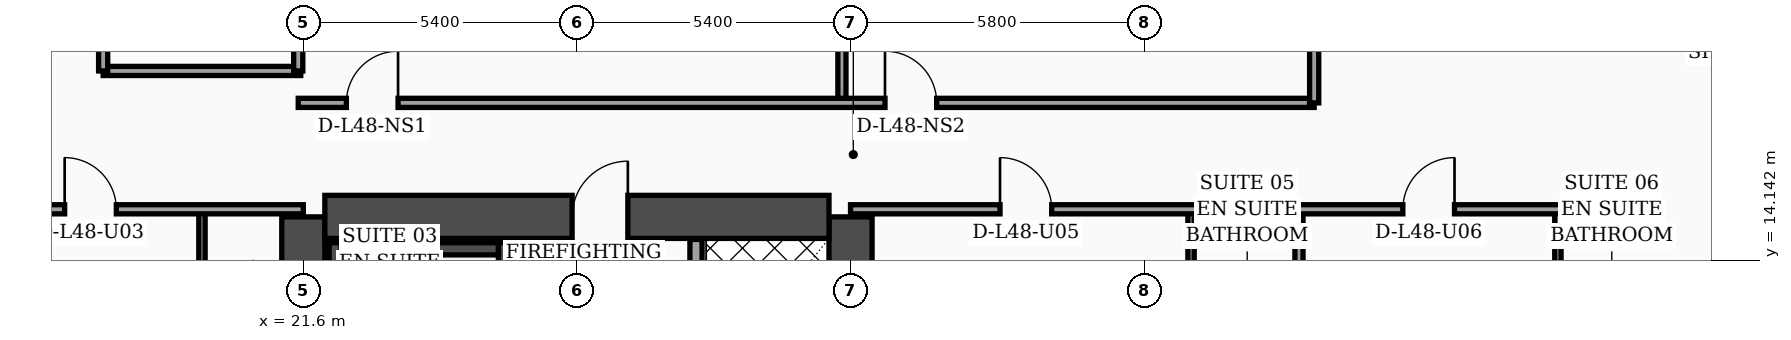
"""IFC4 building model, lengths in metres.
Left out: names, types, materials, properties, quantities, classifications, styles, units other than length and angle.
Written with IfcOpenShell. Run it as: python <this file> out.ifc"""

import sys

from ifc_helpers import new_model, si_unit, direction, frame, frame_2d, origin, place, context, subcontext, project, spatial, rectangle, extrude, element, fill, save


model = new_model("IFC4")
c1 = context("Model", 3, precision=1e-05, world=origin(), true_north=direction((0.0, 1.0)))
c2 = subcontext(c1, "Body", "Model", "MODEL_VIEW")
j1 = project(units=[si_unit("LENGTHUNIT", "METRE"), si_unit("PLANEANGLEUNIT", "RADIAN")], contexts=[c1])
p1 = place(None, origin())
s1 = spatial("IfcSite", under=j1, at=p1, CompositionType="ELEMENT")
p2 = place(p1, origin())
s2 = spatial("IfcBuilding", under=s1, at=p2, CompositionType="ELEMENT")
p3 = place(p2, frame((0.0, 0.0, 195.1)))
s3 = spatial("IfcBuildingStorey", under=s2, at=p3, CompositionType="ELEMENT", Elevation=195.1)
for number, where, z_axis, x_axis in (
    (1, (21.6, 4.6, 0.0), (0.0, 0.0, 1.0), (0.0, 1.0, 0.0)),
    (2, (32.4, 4.6, 0.0), (0.0, 0.0, 1.0), (0.0, 1.0, 0.0)),
):
    element("IfcWall", number, at=place(p3, frame(where, z_axis=z_axis, x_axis=x_axis)), inside=s3, PredefinedType="SHEAR", context=c2, shape_type="SweptSolid", body=[
        extrude(rectangle(XDim=10.4, YDim=0.85, at=frame_2d((5.2, 0.0))), origin(), (0.0, 0.0, 1.0), 4.05),
    ])
p4 = place(p3, frame((22.025, 15.0, 0.0), z_axis=(0.0, 0.0, 1.0), x_axis=(1.0, 0.0, 0.0)))
e3 = element("IfcWall", 3, at=p4, inside=s3, PredefinedType="SHEAR", context=c2, shape_type="SweptSolid", body=[
    extrude(rectangle(XDim=9.95, YDim=0.85, at=frame_2d((4.975, 0.0))), origin(), (0.0, 0.0, 1.0), 4.05),
])
p5 = place(p4, frame((4.88, 0.0, 0.0)))
e4 = element("IfcOpeningElement", 4, at=p5, cuts=e3, PredefinedType="OPENING", context=c2, shape_type="SweptSolid", body=[
    extrude(rectangle(XDim=1.1, YDim=2.2, at=frame_2d((0.55, 1.1))), frame((0.0, 0.435, 0.0), z_axis=(0.0, -1.0, 0.0), x_axis=(1.0, 0.0, 0.0)), (0.0, 0.0, 1.0), 0.87),
])
p6 = place(p3, frame((22.23, 5.025, 0.0), z_axis=(0.0, 0.0, 1.0), x_axis=(0.0, 1.0, 0.0)))
e5 = element("IfcWall", 5, at=p6, inside=s3, PredefinedType="SOLIDWALL", context=c2, shape_type="SweptSolid", body=[
    extrude(rectangle(XDim=9.465, YDim=0.24, at=frame_2d((4.732, 0.0))), origin(), (0.0, 0.0, 1.0), 4.05),
])
p7 = place(p3, frame((25.57, 5.025, 0.0), z_axis=(0.0, 0.0, 1.0), x_axis=(0.0, 1.0, 0.0)))
e6 = element("IfcWall", 6, at=p7, inside=s3, PredefinedType="SOLIDWALL", context=c2, shape_type="SweptSolid", body=[
    extrude(rectangle(XDim=9.465, YDim=0.24, at=frame_2d((4.732, 0.0))), origin(), (0.0, 0.0, 1.0), 4.05),
])
p8 = place(p7, frame((0.35, 0.0, 0.0)))
e7 = element("IfcOpeningElement", 7, at=p8, cuts=e6, PredefinedType="OPENING", context=c2, shape_type="SweptSolid", body=[
    extrude(rectangle(XDim=1.15, YDim=2.2, at=frame_2d((0.575, 1.1))), frame((0.0, 0.13, 0.0), z_axis=(0.0, -1.0, 0.0), x_axis=(1.0, 0.0, 0.0)), (0.0, 0.0, 1.0), 0.26),
])
p9 = place(p3, frame((22.35, 14.37, 0.0), z_axis=(0.0, 0.0, 1.0), x_axis=(1.0, 0.0, 0.0)))
e8 = element("IfcWall", 8, at=p9, inside=s3, PredefinedType="SOLIDWALL", context=c2, shape_type="SweptSolid", body=[
    extrude(rectangle(XDim=3.1, YDim=0.24, at=frame_2d((1.55, 0.0))), origin(), (0.0, 0.0, 1.0), 4.05),
])
p10 = place(p3, frame((55.03, 5.505, 0.0), z_axis=(0.0, 0.0, 1.0), x_axis=(-0.300509063924, 0.953778958931, 0.0)))
e9 = element("IfcWall", 9, at=p10, inside=s3, PredefinedType="SOLIDWALL", context=c2, shape_type="SweptSolid", body=[
    extrude(rectangle(XDim=30.814, YDim=0.32, at=frame_2d((15.407, 0.0))), origin(), (0.0, 0.0, 1.0), 4.05),
])
p11 = place(p10, frame((4.747, 0.0, 0.0)))
e10 = element("IfcOpeningElement", 10, at=p11, cuts=e9, PredefinedType="OPENING", context=c2, shape_type="SweptSolid", body=[
    extrude(rectangle(XDim=1.4, YDim=2.25, at=frame_2d((0.7, 1.125))), frame((0.0, 0.17, 0.0), z_axis=(0.0, -1.0, 0.0), x_axis=(1.0, 0.0, 0.0)), (0.0, 0.0, 1.0), 0.34),
])
p12 = place(p10, frame((9.889, 0.0, 0.7)))
e11 = element("IfcOpeningElement", 11, at=p12, cuts=e9, PredefinedType="OPENING", context=c2, shape_type="SweptSolid", body=[
    extrude(rectangle(XDim=1.6, YDim=1.65, at=frame_2d((0.8, 0.825))), frame((0.0, 0.17, 0.0), z_axis=(0.0, -1.0, 0.0), x_axis=(1.0, 0.0, 0.0)), (0.0, 0.0, 1.0), 0.34),
])
p13 = place(p10, frame((18.696, 0.0, 0.7)))
e12 = element("IfcOpeningElement", 12, at=p13, cuts=e9, PredefinedType="OPENING", context=c2, shape_type="SweptSolid", body=[
    extrude(rectangle(XDim=1.6, YDim=1.65, at=frame_2d((0.8, 0.825))), frame((0.0, 0.17, 0.0), z_axis=(0.0, -1.0, 0.0), x_axis=(1.0, 0.0, 0.0)), (0.0, 0.0, 1.0), 0.34),
])
p14 = place(p10, frame((1.6, 0.0, 0.75)))
e13 = element("IfcOpeningElement", 13, at=p14, cuts=e9, PredefinedType="OPENING", context=c2, shape_type="SweptSolid", body=[
    extrude(rectangle(XDim=1.5, YDim=1.6, at=frame_2d((0.75, 0.8))), frame((0.0, 0.17, 0.0), z_axis=(0.0, -1.0, 0.0), x_axis=(1.0, 0.0, 0.0)), (0.0, 0.0, 1.0), 0.34),
])
p15 = place(p10, frame((7.8, 0.0, 0.75)))
e14 = element("IfcOpeningElement", 14, at=p15, cuts=e9, PredefinedType="OPENING", context=c2, shape_type="SweptSolid", body=[
    extrude(rectangle(XDim=1.5, YDim=1.6, at=frame_2d((0.75, 0.8))), frame((0.0, 0.17, 0.0), z_axis=(0.0, -1.0, 0.0), x_axis=(1.0, 0.0, 0.0)), (0.0, 0.0, 1.0), 0.34),
])
p16 = place(p10, frame((11.95, 0.0, 0.75)))
e15 = element("IfcOpeningElement", 15, at=p16, cuts=e9, PredefinedType="OPENING", context=c2, shape_type="SweptSolid", body=[
    extrude(rectangle(XDim=1.5, YDim=1.6, at=frame_2d((0.75, 0.8))), frame((0.0, 0.17, 0.0), z_axis=(0.0, -1.0, 0.0), x_axis=(1.0, 0.0, 0.0)), (0.0, 0.0, 1.0), 0.34),
])
p17 = place(p10, frame((14.0, 0.0, 0.75)))
e16 = element("IfcOpeningElement", 16, at=p17, cuts=e9, PredefinedType="OPENING", context=c2, shape_type="SweptSolid", body=[
    extrude(rectangle(XDim=1.5, YDim=1.6, at=frame_2d((0.75, 0.8))), frame((0.0, 0.17, 0.0), z_axis=(0.0, -1.0, 0.0), x_axis=(1.0, 0.0, 0.0)), (0.0, 0.0, 1.0), 0.34),
])
p18 = place(p10, frame((16.55, 0.0, 0.75)))
e17 = element("IfcOpeningElement", 17, at=p18, cuts=e9, PredefinedType="OPENING", context=c2, shape_type="SweptSolid", body=[
    extrude(rectangle(XDim=1.5, YDim=1.6, at=frame_2d((0.75, 0.8))), frame((0.0, 0.17, 0.0), z_axis=(0.0, -1.0, 0.0), x_axis=(1.0, 0.0, 0.0)), (0.0, 0.0, 1.0), 0.34),
])
p19 = place(p10, frame((20.75, 0.0, 0.75)))
e18 = element("IfcOpeningElement", 18, at=p19, cuts=e9, PredefinedType="OPENING", context=c2, shape_type="SweptSolid", body=[
    extrude(rectangle(XDim=1.5, YDim=1.6, at=frame_2d((0.75, 0.8))), frame((0.0, 0.17, 0.0), z_axis=(0.0, -1.0, 0.0), x_axis=(1.0, 0.0, 0.0)), (0.0, 0.0, 1.0), 0.34),
])
p20 = place(p10, frame((23.3, 0.0, 0.75)))
e19 = element("IfcOpeningElement", 19, at=p20, cuts=e9, PredefinedType="OPENING", context=c2, shape_type="SweptSolid", body=[
    extrude(rectangle(XDim=1.5, YDim=1.6, at=frame_2d((0.75, 0.8))), frame((0.0, 0.17, 0.0), z_axis=(0.0, -1.0, 0.0), x_axis=(1.0, 0.0, 0.0)), (0.0, 0.0, 1.0), 0.34),
])
p21 = place(p10, frame((26.4, 0.0, 0.75)))
e20 = element("IfcOpeningElement", 20, at=p21, cuts=e9, PredefinedType="OPENING", context=c2, shape_type="SweptSolid", body=[
    extrude(rectangle(XDim=1.5, YDim=1.6, at=frame_2d((0.75, 0.8))), frame((0.0, 0.17, 0.0), z_axis=(0.0, -1.0, 0.0), x_axis=(1.0, 0.0, 0.0)), (0.0, 0.0, 1.0), 0.34),
])
p22 = place(p3, frame((29.35, 5.045, 0.0), z_axis=(0.0, 0.0, 1.0), x_axis=(0.0, 1.0, 0.0)))
e21 = element("IfcWall", 21, at=p22, inside=s3, PredefinedType="SOLIDWALL", context=c2, shape_type="SweptSolid", body=[
    extrude(rectangle(XDim=9.51, YDim=0.24, at=frame_2d((4.755, 0.0))), origin(), (0.0, 0.0, 1.0), 4.05),
])
p23 = place(p22, frame((0.55, 0.0, 0.0)))
e22 = element("IfcOpeningElement", 22, at=p23, cuts=e21, PredefinedType="OPENING", context=c2, shape_type="SweptSolid", body=[
    extrude(rectangle(XDim=1.3, YDim=2.35, at=frame_2d((0.65, 1.175))), frame((0.0, 0.13, 0.0), z_axis=(0.0, -1.0, 0.0), x_axis=(1.0, 0.0, 0.0)), (0.0, 0.0, 1.0), 0.26),
])
p24 = place(p3, frame((19.6, 2.44, 0.0), z_axis=(0.0, 0.0, 1.0), x_axis=(0.0, 1.0, 0.0)))
e23 = element("IfcWall", 23, at=p24, inside=s3, PredefinedType="PARTITIONING", context=c2, shape_type="SweptSolid", body=[
    extrude(rectangle(XDim=12.71, YDim=0.125, at=frame_2d((6.355, 0.0))), origin(), (0.0, 0.0, 1.0), 2.35),
])
p25 = place(p24, frame((4.34, 0.0, 0.0)))
e24 = element("IfcOpeningElement", 24, at=p25, cuts=e23, PredefinedType="OPENING", context=c2, shape_type="SweptSolid", body=[
    extrude(rectangle(XDim=0.96, YDim=2.2, at=frame_2d((0.48, 1.1))), frame((0.0, 0.073, 0.0), z_axis=(0.0, -1.0, 0.0), x_axis=(1.0, 0.0, 0.0)), (0.0, 0.0, 1.0), 0.145),
])
p26 = place(p24, frame((10.18, 0.0, 0.0)))
e25 = element("IfcOpeningElement", 25, at=p26, cuts=e23, PredefinedType="OPENING", context=c2, shape_type="SweptSolid", body=[
    extrude(rectangle(XDim=0.9, YDim=2.15, at=frame_2d((0.45, 1.075))), frame((0.0, 0.073, 0.0), z_axis=(0.0, -1.0, 0.0), x_axis=(1.0, 0.0, 0.0)), (0.0, 0.0, 1.0), 0.145),
])
p27 = place(p3, frame((15.15, 15.15, 0.0), z_axis=(0.0, 0.0, 1.0), x_axis=(1.0, 0.0, 0.0)))
e26 = element("IfcWall", 26, at=p27, inside=s3, PredefinedType="PARTITIONING", context=c2, shape_type="SweptSolid", body=[
    extrude(rectangle(XDim=6.45, YDim=0.18, at=frame_2d((3.225, 0.0))), origin(), (0.0, 0.0, 1.0), 2.35),
])
p28 = place(p27, frame((1.74, 0.0, 0.0)))
e27 = element("IfcOpeningElement", 27, at=p28, cuts=e26, PredefinedType="OPENING", context=c2, shape_type="SweptSolid", body=[
    extrude(rectangle(XDim=1.02, YDim=2.2, at=frame_2d((0.51, 1.1))), frame((0.0, 0.1, 0.0), z_axis=(0.0, -1.0, 0.0), x_axis=(1.0, 0.0, 0.0)), (0.0, 0.0, 1.0), 0.2),
])
p29 = place(p3, frame((17.65, 17.88, 0.0), z_axis=(0.0, 0.0, 1.0), x_axis=(1.0, 0.0, 0.0)))
e28 = element("IfcWall", 28, at=p29, inside=s3, PredefinedType="PARTITIONING", context=c2, shape_type="SweptSolid", body=[
    extrude(rectangle(XDim=3.9, YDim=0.18, at=frame_2d((1.95, 0.0))), origin(), (0.0, 0.0, 1.0), 4.05),
])
p30 = place(p3, frame((21.5, 17.88, 0.0), z_axis=(0.0, 0.0, 1.0), x_axis=(0.0, 1.0, 0.0)))
e29 = element("IfcWall", 29, at=p30, inside=s3, PredefinedType="PARTITIONING", context=c2, shape_type="SweptSolid", body=[
    extrude(rectangle(XDim=6.44, YDim=0.18, at=frame_2d((3.22, 0.0))), origin(), (0.0, 0.0, 1.0), 4.05),
])
p31 = place(p3, frame((17.65, 17.88, 0.0), z_axis=(0.0, 0.0, 1.0), x_axis=(0.0, 1.0, 0.0)))
e30 = element("IfcWall", 30, at=p31, inside=s3, PredefinedType="PARTITIONING", context=c2, shape_type="SweptSolid", body=[
    extrude(rectangle(XDim=6.44, YDim=0.18, at=frame_2d((3.22, 0.0))), origin(), (0.0, 0.0, 1.0), 4.05),
])
p32 = place(p31, frame((0.65, 0.0, 0.0)))
e31 = element("IfcOpeningElement", 31, at=p32, cuts=e30, PredefinedType="OPENING", context=c2, shape_type="SweptSolid", body=[
    extrude(rectangle(XDim=0.98, YDim=2.15, at=frame_2d((0.49, 1.075))), frame((0.0, 0.1, 0.0), z_axis=(0.0, -1.0, 0.0), x_axis=(1.0, 0.0, 0.0)), (0.0, 0.0, 1.0), 0.2),
])
p33 = place(p31, frame((3.97, 0.0, 0.0)))
e32 = element("IfcOpeningElement", 32, at=p33, cuts=e30, PredefinedType="OPENING", context=c2, shape_type="SweptSolid", body=[
    extrude(rectangle(XDim=0.96, YDim=2.2, at=frame_2d((0.48, 1.1))), frame((0.0, 0.1, 0.0), z_axis=(0.0, -1.0, 0.0), x_axis=(1.0, 0.0, 0.0)), (0.0, 0.0, 1.0), 0.2),
])
p34 = place(p3, frame((39.12, 2.44, 0.0), z_axis=(0.0, 0.0, 1.0), x_axis=(0.0, 1.0, 0.0)))
e33 = element("IfcWall", 33, at=p34, inside=s3, PredefinedType="PARTITIONING", context=c2, shape_type="SweptSolid", body=[
    extrude(rectangle(XDim=12.71, YDim=0.125, at=frame_2d((6.355, 0.0))), origin(), (0.0, 0.0, 1.0), 2.35),
])
p35 = place(p34, frame((4.35, 0.0, 0.0)))
e34 = element("IfcOpeningElement", 34, at=p35, cuts=e33, PredefinedType="OPENING", context=c2, shape_type="SweptSolid", body=[
    extrude(rectangle(XDim=0.96, YDim=2.2, at=frame_2d((0.48, 1.1))), frame((0.0, 0.073, 0.0), z_axis=(0.0, -1.0, 0.0), x_axis=(1.0, 0.0, 0.0)), (0.0, 0.0, 1.0), 0.145),
])
p36 = place(p34, frame((10.21, 0.0, 0.0)))
e35 = element("IfcOpeningElement", 35, at=p36, cuts=e33, PredefinedType="OPENING", context=c2, shape_type="SweptSolid", body=[
    extrude(rectangle(XDim=0.9, YDim=2.15, at=frame_2d((0.45, 1.075))), frame((0.0, 0.073, 0.0), z_axis=(0.0, -1.0, 0.0), x_axis=(1.0, 0.0, 0.0)), (0.0, 0.0, 1.0), 0.145),
])
p37 = place(p3, frame((46.36, 2.44, 0.0), z_axis=(0.0, 0.0, 1.0), x_axis=(0.0, 1.0, 0.0)))
e36 = element("IfcWall", 36, at=p37, inside=s3, PredefinedType="PARTITIONING", context=c2, shape_type="SweptSolid", body=[
    extrude(rectangle(XDim=12.71, YDim=0.125, at=frame_2d((6.355, 0.0))), origin(), (0.0, 0.0, 1.0), 2.35),
])
p38 = place(p37, frame((4.35, 0.0, 0.0)))
e37 = element("IfcOpeningElement", 37, at=p38, cuts=e36, PredefinedType="OPENING", context=c2, shape_type="SweptSolid", body=[
    extrude(rectangle(XDim=0.96, YDim=2.2, at=frame_2d((0.48, 1.1))), frame((0.0, 0.073, 0.0), z_axis=(0.0, -1.0, 0.0), x_axis=(1.0, 0.0, 0.0)), (0.0, 0.0, 1.0), 0.145),
])
p39 = place(p37, frame((10.21, 0.0, 0.0)))
e38 = element("IfcOpeningElement", 38, at=p39, cuts=e36, PredefinedType="OPENING", context=c2, shape_type="SweptSolid", body=[
    extrude(rectangle(XDim=0.9, YDim=2.15, at=frame_2d((0.45, 1.075))), frame((0.0, 0.073, 0.0), z_axis=(0.0, -1.0, 0.0), x_axis=(1.0, 0.0, 0.0)), (0.0, 0.0, 1.0), 0.145),
])
p40 = place(p3, frame((41.25, 2.44, 0.0), z_axis=(0.0, 0.0, 1.0), x_axis=(0.0, 1.0, 0.0)))
e39 = element("IfcWall", 39, at=p40, inside=s3, PredefinedType="PARTITIONING", context=c2, shape_type="SweptSolid", body=[
    extrude(rectangle(XDim=12.71, YDim=0.16, at=frame_2d((6.355, 0.0))), origin(), (0.0, 0.0, 1.0), 2.35),
])
p41 = place(p3, frame((32.4, 15.15, 0.0), z_axis=(0.0, 0.0, 1.0), x_axis=(1.0, 0.0, 0.0)))
e40 = element("IfcWall", 40, at=p41, inside=s3, PredefinedType="PARTITIONING", context=c2, shape_type="SweptSolid", body=[
    extrude(rectangle(XDim=16.0, YDim=0.18, at=frame_2d((8.0, 0.0))), origin(), (0.0, 0.0, 1.0), 2.35),
])
p42 = place(p41, frame((2.95, 0.0, 0.0)))
e41 = element("IfcOpeningElement", 41, at=p42, cuts=e40, PredefinedType="OPENING", context=c2, shape_type="SweptSolid", body=[
    extrude(rectangle(XDim=1.02, YDim=2.2, at=frame_2d((0.51, 1.1))), frame((0.0, 0.1, 0.0), z_axis=(0.0, -1.0, 0.0), x_axis=(1.0, 0.0, 0.0)), (0.0, 0.0, 1.0), 0.2),
])
p43 = place(p41, frame((10.9, 0.0, 0.0)))
e42 = element("IfcOpeningElement", 42, at=p43, cuts=e40, PredefinedType="OPENING", context=c2, shape_type="SweptSolid", body=[
    extrude(rectangle(XDim=1.02, YDim=2.2, at=frame_2d((0.51, 1.1))), frame((0.0, 0.1, 0.0), z_axis=(0.0, -1.0, 0.0), x_axis=(1.0, 0.0, 0.0)), (0.0, 0.0, 1.0), 0.2),
])
p44 = place(p3, frame((32.23, 17.25, 0.0), z_axis=(0.0, 0.0, 1.0), x_axis=(0.0, 1.0, 0.0)))
e43 = element("IfcWall", 43, at=p44, inside=s3, PredefinedType="PARTITIONING", context=c2, shape_type="SweptSolid", body=[
    extrude(rectangle(XDim=14.39, YDim=0.16, at=frame_2d((7.195, 0.0))), origin(), (0.0, 0.0, 1.0), 2.35),
])
p45 = place(p3, frame((21.5, 17.25, 0.0), z_axis=(0.0, 0.0, 1.0), x_axis=(1.0, 0.0, 0.0)))
e44 = element("IfcWall", 44, at=p45, inside=s3, PredefinedType="PARTITIONING", context=c2, shape_type="SweptSolid", body=[
    extrude(rectangle(XDim=20.05, YDim=0.18, at=frame_2d((10.025, 0.0))), origin(), (0.0, 0.0, 1.0), 2.35),
])
p46 = place(p45, frame((0.95, 0.0, 0.0)))
e45 = element("IfcOpeningElement", 45, at=p46, cuts=e44, PredefinedType="OPENING", context=c2, shape_type="SweptSolid", body=[
    extrude(rectangle(XDim=1.02, YDim=2.2, at=frame_2d((0.51, 1.1))), frame((0.0, 0.1, 0.0), z_axis=(0.0, -1.0, 0.0), x_axis=(1.0, 0.0, 0.0)), (0.0, 0.0, 1.0), 0.2),
])
p47 = place(p45, frame((11.58, 0.0, 0.0)))
e46 = element("IfcOpeningElement", 46, at=p47, cuts=e44, PredefinedType="OPENING", context=c2, shape_type="SweptSolid", body=[
    extrude(rectangle(XDim=1.02, YDim=2.2, at=frame_2d((0.51, 1.1))), frame((0.0, 0.1, 0.0), z_axis=(0.0, -1.0, 0.0), x_axis=(1.0, 0.0, 0.0)), (0.0, 0.0, 1.0), 0.2),
])
p48 = place(p3, frame((41.55, 17.25, 0.0), z_axis=(0.0, 0.0, 1.0), x_axis=(0.0, 1.0, 0.0)))
e47 = element("IfcWall", 47, at=p48, inside=s3, PredefinedType="PARTITIONING", context=c2, shape_type="SweptSolid", body=[
    extrude(rectangle(XDim=20.66, YDim=0.18, at=frame_2d((10.33, 0.0))), origin(), (0.0, 0.0, 1.0), 2.35),
])
p49 = place(p28, origin())
e48 = element("IfcDoor", 48, at=p49, inside=s3, OperationType="SINGLE_SWING_LEFT", PredefinedType="DOOR", context=c2, shape_type="SweptSolid", body=[
    extrude(rectangle(XDim=1.02, YDim=2.2, at=frame_2d((0.51, 1.1))), frame((0.0, 0.025, 0.0), z_axis=(0.0, -1.0, 0.0), x_axis=(1.0, 0.0, 0.0)), (0.0, 0.0, 1.0), 0.05),
])
fill(e27, e48)
p50 = place(p42, origin())
e49 = element("IfcDoor", 49, at=p50, inside=s3, OperationType="SINGLE_SWING_LEFT", PredefinedType="DOOR", context=c2, shape_type="SweptSolid", body=[
    extrude(rectangle(XDim=1.02, YDim=2.2, at=frame_2d((0.51, 1.1))), frame((0.0, 0.025, 0.0), z_axis=(0.0, -1.0, 0.0), x_axis=(1.0, 0.0, 0.0)), (0.0, 0.0, 1.0), 0.05),
])
fill(e41, e49)
p51 = place(p43, origin())
e50 = element("IfcDoor", 50, at=p51, inside=s3, OperationType="SINGLE_SWING_RIGHT", PredefinedType="DOOR", context=c2, shape_type="SweptSolid", body=[
    extrude(rectangle(XDim=1.02, YDim=2.2, at=frame_2d((0.51, 1.1))), frame((0.0, 0.025, 0.0), z_axis=(0.0, -1.0, 0.0), x_axis=(1.0, 0.0, 0.0)), (0.0, 0.0, 1.0), 0.05),
])
fill(e42, e50)
p52 = place(p46, origin())
e51 = element("IfcDoor", 51, at=p52, inside=s3, OperationType="SINGLE_SWING_RIGHT", PredefinedType="DOOR", context=c2, shape_type="SweptSolid", body=[
    extrude(rectangle(XDim=1.02, YDim=2.2, at=frame_2d((0.51, 1.1))), frame((0.0, 0.025, 0.0), z_axis=(0.0, -1.0, 0.0), x_axis=(1.0, 0.0, 0.0)), (0.0, 0.0, 1.0), 0.05),
])
fill(e45, e51)
p53 = place(p47, origin())
e52 = element("IfcDoor", 52, at=p53, inside=s3, OperationType="SINGLE_SWING_LEFT", PredefinedType="DOOR", context=c2, shape_type="SweptSolid", body=[
    extrude(rectangle(XDim=1.02, YDim=2.2, at=frame_2d((0.51, 1.1))), frame((0.0, 0.025, 0.0), z_axis=(0.0, -1.0, 0.0), x_axis=(1.0, 0.0, 0.0)), (0.0, 0.0, 1.0), 0.05),
])
fill(e46, e52)
p54 = place(p5, origin())
e53 = element("IfcDoor", 53, at=p54, inside=s3, OperationType="SINGLE_SWING_RIGHT", PredefinedType="DOOR", context=c2, shape_type="SweptSolid", body=[
    extrude(rectangle(XDim=1.1, YDim=2.2, at=frame_2d((0.55, 1.1))), frame((0.0, 0.025, 0.0), z_axis=(0.0, -1.0, 0.0), x_axis=(1.0, 0.0, 0.0)), (0.0, 0.0, 1.0), 0.05),
])
fill(e4, e53)
save(model, sys.argv[1])
